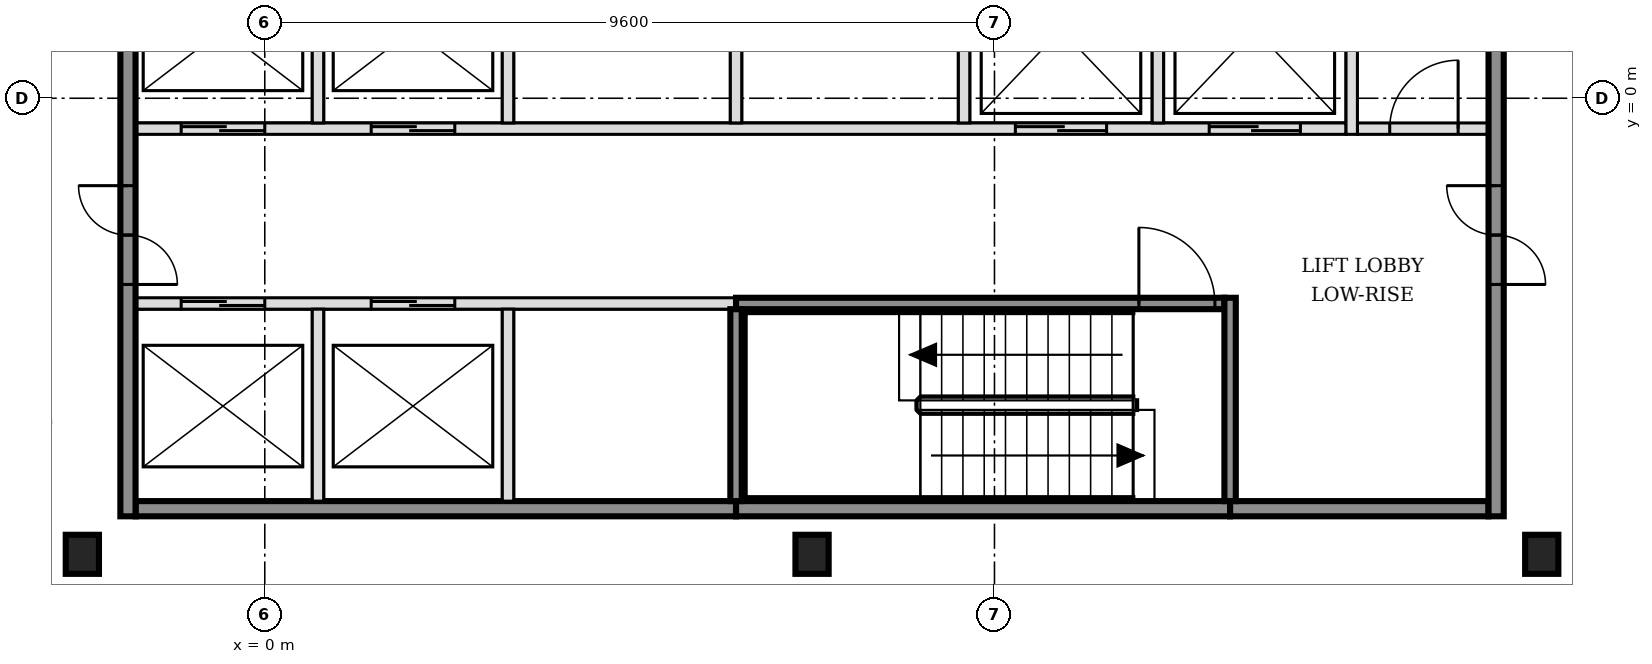
"""IFC4 building model, lengths in metres.
Left out: names, types, materials, properties, quantities, classifications, styles, units other than length and angle.
Written with IfcOpenShell. Run it as: python <this file> out.ifc"""

import sys

from ifc_helpers import new_model, si_unit, direction, frame, frame_2d, origin, origin_2d, place, context, subcontext, project, spatial, rectangle, i_section, extrude, element, fill, save


model = new_model("IFC4")
c1 = context("Model", 3, precision=1e-05, world=origin(), true_north=direction((0.0, 1.0)))
c2 = subcontext(c1, "Body", "Model", "MODEL_VIEW")
j1 = project(units=[si_unit("LENGTHUNIT", "METRE"), si_unit("PLANEANGLEUNIT", "RADIAN")], contexts=[c1])
p1 = place(None, origin())
s1 = spatial("IfcSite", under=j1, at=p1, CompositionType="ELEMENT")
p2 = place(p1, origin())
s2 = spatial("IfcBuilding", under=s1, at=p2, CompositionType="ELEMENT")
p3 = place(p2, frame((0.0, 0.0, 101.4)))
s3 = spatial("IfcBuildingStorey", under=s2, at=p3, CompositionType="ELEMENT", Elevation=101.4)
for number, where, z_axis, x_axis in (
    (1, (-2.4, -6.0, -0.15), (0.0, 0.0, 1.0), (1.0, 0.0, 0.0)),
    (2, (7.2, -6.0, -0.15), (0.0, 0.0, 1.0), (1.0, 0.0, 0.0)),
    (3, (16.8, -6.0, -0.15), (0.0, 0.0, 1.0), (1.0, 0.0, 0.0)),
):
    element("IfcColumn", number, at=place(p3, frame(where, z_axis=z_axis, x_axis=x_axis)), inside=s3, PredefinedType="COLUMN", context=c2, shape_type="SweptSolid", body=[
        extrude(i_section(OverallWidth=0.437, OverallDepth=0.514, WebThickness=0.061, FlangeThickness=0.097, FilletRadius=0.015, at=origin_2d()), origin(), (0.0, 0.0, 1.0), 3.6),
    ])
p4 = place(p3, frame((-1.7, -5.4, 0.0), z_axis=(0.0, 0.0, 1.0), x_axis=(1.0, 0.0, 0.0)))
e4 = element("IfcWall", 4, at=p4, inside=s3, PredefinedType="SOLIDWALL", context=c2, shape_type="SweptSolid", body=[
    extrude(rectangle(XDim=7.9, YDim=0.2, at=frame_2d((3.95, 0.0))), origin(), (0.0, 0.0, 1.0), 3.45),
])
p5 = place(p3, frame((6.2, -5.4, 0.0), z_axis=(0.0, 0.0, 1.0), x_axis=(1.0, 0.0, 0.0)))
e5 = element("IfcWall", 5, at=p5, inside=s3, PredefinedType="SOLIDWALL", context=c2, shape_type="SweptSolid", body=[
    extrude(rectangle(XDim=6.5, YDim=0.2, at=frame_2d((3.25, 0.0))), origin(), (0.0, 0.0, 1.0), 3.45),
])
p6 = place(p3, frame((12.7, -5.4, 0.0), z_axis=(0.0, 0.0, 1.0), x_axis=(1.0, 0.0, 0.0)))
e6 = element("IfcWall", 6, at=p6, inside=s3, PredefinedType="SOLIDWALL", context=c2, shape_type="SweptSolid", body=[
    extrude(rectangle(XDim=3.4, YDim=0.2, at=frame_2d((1.7, 0.0))), origin(), (0.0, 0.0, 1.0), 3.45),
])
p7 = place(p3, frame((-1.7, -2.7, 0.0), z_axis=(0.0, 0.0, 1.0), x_axis=(1.0, 0.0, 0.0)))
e7 = element("IfcWall", 7, at=p7, inside=s3, PredefinedType="SOLIDWALL", context=c2, shape_type="SweptSolid", body=[
    extrude(rectangle(XDim=7.9, YDim=0.15, at=frame_2d((3.95, 0.0))), origin(), (0.0, 0.0, 1.0), 3.45),
])
p8 = place(p7, frame((0.6, 0.0, 0.0)))
e8 = element("IfcOpeningElement", 8, at=p8, cuts=e7, PredefinedType="OPENING", context=c2, shape_type="SweptSolid", body=[
    extrude(rectangle(XDim=1.1, YDim=2.1, at=frame_2d((0.55, 1.05))), frame((0.0, 0.085, 0.0), z_axis=(0.0, -1.0, 0.0), x_axis=(1.0, 0.0, 0.0)), (0.0, 0.0, 1.0), 0.17),
])
p9 = place(p7, frame((3.1, 0.0, 0.0)))
e9 = element("IfcOpeningElement", 9, at=p9, cuts=e7, PredefinedType="OPENING", context=c2, shape_type="SweptSolid", body=[
    extrude(rectangle(XDim=1.1, YDim=2.1, at=frame_2d((0.55, 1.05))), frame((0.0, 0.085, 0.0), z_axis=(0.0, -1.0, 0.0), x_axis=(1.0, 0.0, 0.0)), (0.0, 0.0, 1.0), 0.17),
])
p10 = place(p3, frame((6.2, -2.7, 0.0), z_axis=(0.0, 0.0, 1.0), x_axis=(1.0, 0.0, 0.0)))
e10 = element("IfcWall", 10, at=p10, inside=s3, PredefinedType="SOLIDWALL", context=c2, shape_type="SweptSolid", body=[
    extrude(rectangle(XDim=6.425, YDim=0.15, at=frame_2d((3.212, 0.0))), origin(), (0.0, 0.0, 1.0), 3.45),
])
p11 = place(p10, frame((5.3, 0.0, 0.0)))
e11 = element("IfcOpeningElement", 11, at=p11, cuts=e10, PredefinedType="OPENING", context=c2, shape_type="SweptSolid", body=[
    extrude(rectangle(XDim=1.0, YDim=2.1, at=frame_2d((0.5, 1.05))), frame((0.0, 0.085, 0.0), z_axis=(0.0, -1.0, 0.0), x_axis=(1.0, 0.0, 0.0)), (0.0, 0.0, 1.0), 0.17),
])
p12 = place(p3, frame((-1.7, -0.4, 0.0), z_axis=(0.0, 0.0, 1.0), x_axis=(1.0, 0.0, 0.0)))
e12 = element("IfcWall", 12, at=p12, inside=s3, PredefinedType="SOLIDWALL", context=c2, shape_type="SweptSolid", body=[
    extrude(rectangle(XDim=15.925, YDim=0.15, at=frame_2d((7.962, 0.0))), origin(), (0.0, 0.0, 1.0), 3.45),
])
p13 = place(p12, frame((0.6, 0.0, 0.0)))
e13 = element("IfcOpeningElement", 13, at=p13, cuts=e12, PredefinedType="OPENING", context=c2, shape_type="SweptSolid", body=[
    extrude(rectangle(XDim=1.1, YDim=2.1, at=frame_2d((0.55, 1.05))), frame((0.0, 0.085, 0.0), z_axis=(0.0, -1.0, 0.0), x_axis=(1.0, 0.0, 0.0)), (0.0, 0.0, 1.0), 0.17),
])
p14 = place(p12, frame((3.1, 0.0, 0.0)))
e14 = element("IfcOpeningElement", 14, at=p14, cuts=e12, PredefinedType="OPENING", context=c2, shape_type="SweptSolid", body=[
    extrude(rectangle(XDim=1.1, YDim=2.1, at=frame_2d((0.55, 1.05))), frame((0.0, 0.085, 0.0), z_axis=(0.0, -1.0, 0.0), x_axis=(1.0, 0.0, 0.0)), (0.0, 0.0, 1.0), 0.17),
])
p15 = place(p12, frame((11.575, 0.0, 0.0)))
e15 = element("IfcOpeningElement", 15, at=p15, cuts=e12, PredefinedType="OPENING", context=c2, shape_type="SweptSolid", body=[
    extrude(rectangle(XDim=1.2, YDim=2.1, at=frame_2d((0.6, 1.05))), frame((0.0, 0.085, 0.0), z_axis=(0.0, -1.0, 0.0), x_axis=(1.0, 0.0, 0.0)), (0.0, 0.0, 1.0), 0.17),
])
p16 = place(p12, frame((14.125, 0.0, 0.0)))
e16 = element("IfcOpeningElement", 16, at=p16, cuts=e12, PredefinedType="OPENING", context=c2, shape_type="SweptSolid", body=[
    extrude(rectangle(XDim=1.2, YDim=2.1, at=frame_2d((0.6, 1.05))), frame((0.0, 0.085, 0.0), z_axis=(0.0, -1.0, 0.0), x_axis=(1.0, 0.0, 0.0)), (0.0, 0.0, 1.0), 0.17),
])
p17 = place(p3, frame((14.375, -0.4, 0.0), z_axis=(0.0, 0.0, 1.0), x_axis=(1.0, 0.0, 0.0)))
e17 = element("IfcWall", 17, at=p17, inside=s3, PredefinedType="PARTITIONING", context=c2, shape_type="SweptSolid", body=[
    extrude(rectangle(XDim=1.725, YDim=0.15, at=frame_2d((0.863, 0.0))), origin(), (0.0, 0.0, 1.0), 3.45),
])
p18 = place(p17, frame((0.425, 0.0, 0.0)))
e18 = element("IfcOpeningElement", 18, at=p18, cuts=e17, PredefinedType="OPENING", context=c2, shape_type="SweptSolid", body=[
    extrude(rectangle(XDim=0.9, YDim=2.1, at=frame_2d((0.45, 1.05))), frame((0.0, 0.085, 0.0), z_axis=(0.0, -1.0, 0.0), x_axis=(1.0, 0.0, 0.0)), (0.0, 0.0, 1.0), 0.17),
])
p19 = place(p3, frame((-1.8, -5.5, 0.0), z_axis=(0.0, 0.0, 1.0), x_axis=(0.0, 1.0, 0.0)))
e19 = element("IfcWall", 19, at=p19, inside=s3, PredefinedType="SOLIDWALL", context=c2, shape_type="SweptSolid", body=[
    extrude(rectangle(XDim=15.8, YDim=0.2, at=frame_2d((7.9, 0.0))), origin(), (0.0, 0.0, 1.0), 3.45),
])
p20 = place(p19, frame((3.05, 0.0, 0.0)))
e20 = element("IfcOpeningElement", 20, at=p20, cuts=e19, PredefinedType="OPENING", context=c2, shape_type="SweptSolid", body=[
    extrude(rectangle(XDim=1.3, YDim=2.1, at=frame_2d((0.65, 1.05))), frame((0.0, 0.11, 0.0), z_axis=(0.0, -1.0, 0.0), x_axis=(1.0, 0.0, 0.0)), (0.0, 0.0, 1.0), 0.22),
])
p21 = place(p19, frame((11.45, 0.0, 0.0)))
e21 = element("IfcOpeningElement", 21, at=p21, cuts=e19, PredefinedType="OPENING", context=c2, shape_type="SweptSolid", body=[
    extrude(rectangle(XDim=1.3, YDim=2.1, at=frame_2d((0.65, 1.05))), frame((0.0, 0.11, 0.0), z_axis=(0.0, -1.0, 0.0), x_axis=(1.0, 0.0, 0.0)), (0.0, 0.0, 1.0), 0.22),
])
p22 = place(p3, frame((0.7, -5.3, 0.0), z_axis=(0.0, 0.0, 1.0), x_axis=(0.0, 1.0, 0.0)))
e22 = element("IfcWall", 22, at=p22, inside=s3, PredefinedType="SOLIDWALL", context=c2, shape_type="SweptSolid", body=[
    extrude(rectangle(XDim=2.525, YDim=0.15, at=frame_2d((1.263, 0.0))), origin(), (0.0, 0.0, 1.0), 3.45),
])
p23 = place(p3, frame((0.7, -0.325, 0.0), z_axis=(0.0, 0.0, 1.0), x_axis=(0.0, 1.0, 0.0)))
e23 = element("IfcWall", 23, at=p23, inside=s3, PredefinedType="SOLIDWALL", context=c2, shape_type="SweptSolid", body=[
    extrude(rectangle(XDim=2.45, YDim=0.15, at=frame_2d((1.225, 0.0))), origin(), (0.0, 0.0, 1.0), 3.45),
])
p24 = place(p3, frame((3.2, -5.3, 0.0), z_axis=(0.0, 0.0, 1.0), x_axis=(0.0, 1.0, 0.0)))
e24 = element("IfcWall", 24, at=p24, inside=s3, PredefinedType="SOLIDWALL", context=c2, shape_type="SweptSolid", body=[
    extrude(rectangle(XDim=2.525, YDim=0.15, at=frame_2d((1.263, 0.0))), origin(), (0.0, 0.0, 1.0), 3.45),
])
p25 = place(p3, frame((3.2, -0.325, 0.0), z_axis=(0.0, 0.0, 1.0), x_axis=(0.0, 1.0, 0.0)))
e25 = element("IfcWall", 25, at=p25, inside=s3, PredefinedType="SOLIDWALL", context=c2, shape_type="SweptSolid", body=[
    extrude(rectangle(XDim=2.45, YDim=0.15, at=frame_2d((1.225, 0.0))), origin(), (0.0, 0.0, 1.0), 3.45),
])
p26 = place(p3, frame((6.2, -5.3, 0.0), z_axis=(0.0, 0.0, 1.0), x_axis=(0.0, 1.0, 0.0)))
e26 = element("IfcWall", 26, at=p26, inside=s3, PredefinedType="SOLIDWALL", context=c2, shape_type="SweptSolid", body=[
    extrude(rectangle(XDim=2.525, YDim=0.15, at=frame_2d((1.263, 0.0))), origin(), (0.0, 0.0, 1.0), 3.45),
])
for number, where, z_axis, x_axis in (
    (27, (6.2, -0.325, 0.0), (0.0, 0.0, 1.0), (0.0, 1.0, 0.0)),
    (28, (9.2, -0.325, 0.0), (0.0, 0.0, 1.0), (0.0, 1.0, 0.0)),
    (29, (11.75, -0.325, 0.0), (0.0, 0.0, 1.0), (0.0, 1.0, 0.0)),
):
    element("IfcWall", number, at=place(p3, frame(where, z_axis=z_axis, x_axis=x_axis)), inside=s3, PredefinedType="SOLIDWALL", context=c2, shape_type="SweptSolid", body=[
        extrude(rectangle(XDim=2.45, YDim=0.15, at=frame_2d((1.225, 0.0))), origin(), (0.0, 0.0, 1.0), 3.45),
    ])
p27 = place(p3, frame((12.7, -5.3, 0.0), z_axis=(0.0, 0.0, 1.0), x_axis=(0.0, 1.0, 0.0)))
e30 = element("IfcWall", 30, at=p27, inside=s3, PredefinedType="SOLIDWALL", context=c2, shape_type="SweptSolid", body=[
    extrude(rectangle(XDim=2.675, YDim=0.15, at=frame_2d((1.337, 0.0))), origin(), (0.0, 0.0, 1.0), 3.45),
])
p28 = place(p3, frame((14.3, -0.475, 0.0), z_axis=(0.0, 0.0, 1.0), x_axis=(0.0, 1.0, 0.0)))
e31 = element("IfcWall", 31, at=p28, inside=s3, PredefinedType="SOLIDWALL", context=c2, shape_type="SweptSolid", body=[
    extrude(rectangle(XDim=2.75, YDim=0.15, at=frame_2d((1.375, 0.0))), origin(), (0.0, 0.0, 1.0), 3.45),
])
p29 = place(p3, frame((16.2, -5.5, 0.0), z_axis=(0.0, 0.0, 1.0), x_axis=(0.0, 1.0, 0.0)))
e32 = element("IfcWall", 32, at=p29, inside=s3, PredefinedType="SOLIDWALL", context=c2, shape_type="SweptSolid", body=[
    extrude(rectangle(XDim=15.8, YDim=0.2, at=frame_2d((7.9, 0.0))), origin(), (0.0, 0.0, 1.0), 3.45),
])
p30 = place(p29, frame((3.05, 0.0, 0.0)))
e33 = element("IfcOpeningElement", 33, at=p30, cuts=e32, PredefinedType="OPENING", context=c2, shape_type="SweptSolid", body=[
    extrude(rectangle(XDim=1.3, YDim=2.1, at=frame_2d((0.65, 1.05))), frame((0.0, 0.11, 0.0), z_axis=(0.0, -1.0, 0.0), x_axis=(1.0, 0.0, 0.0)), (0.0, 0.0, 1.0), 0.22),
])
p31 = place(p29, frame((11.45, 0.0, 0.0)))
e34 = element("IfcOpeningElement", 34, at=p31, cuts=e32, PredefinedType="OPENING", context=c2, shape_type="SweptSolid", body=[
    extrude(rectangle(XDim=1.3, YDim=2.1, at=frame_2d((0.65, 1.05))), frame((0.0, 0.11, 0.0), z_axis=(0.0, -1.0, 0.0), x_axis=(1.0, 0.0, 0.0)), (0.0, 0.0, 1.0), 0.22),
])
p32 = place(p8, origin())
e35 = element("IfcDoor", 35, at=p32, inside=s3, OperationType="DOUBLE_DOOR_SLIDING", PredefinedType="DOOR", context=c2, shape_type="SweptSolid", body=[
    extrude(rectangle(XDim=1.1, YDim=2.1, at=frame_2d((0.55, 1.05))), frame((0.0, 0.025, 0.0), z_axis=(0.0, -1.0, 0.0), x_axis=(1.0, 0.0, 0.0)), (0.0, 0.0, 1.0), 0.05),
])
fill(e8, e35)
p33 = place(p9, origin())
e36 = element("IfcDoor", 36, at=p33, inside=s3, OperationType="DOUBLE_DOOR_SLIDING", PredefinedType="DOOR", context=c2, shape_type="SweptSolid", body=[
    extrude(rectangle(XDim=1.1, YDim=2.1, at=frame_2d((0.55, 1.05))), frame((0.0, 0.025, 0.0), z_axis=(0.0, -1.0, 0.0), x_axis=(1.0, 0.0, 0.0)), (0.0, 0.0, 1.0), 0.05),
])
fill(e9, e36)
p34 = place(p13, origin())
e37 = element("IfcDoor", 37, at=p34, inside=s3, OperationType="DOUBLE_DOOR_SLIDING", PredefinedType="DOOR", context=c2, shape_type="SweptSolid", body=[
    extrude(rectangle(XDim=1.1, YDim=2.1, at=frame_2d((0.55, 1.05))), frame((0.0, 0.025, 0.0), z_axis=(0.0, -1.0, 0.0), x_axis=(1.0, 0.0, 0.0)), (0.0, 0.0, 1.0), 0.05),
])
fill(e13, e37)
p35 = place(p14, origin())
e38 = element("IfcDoor", 38, at=p35, inside=s3, OperationType="DOUBLE_DOOR_SLIDING", PredefinedType="DOOR", context=c2, shape_type="SweptSolid", body=[
    extrude(rectangle(XDim=1.1, YDim=2.1, at=frame_2d((0.55, 1.05))), frame((0.0, 0.025, 0.0), z_axis=(0.0, -1.0, 0.0), x_axis=(1.0, 0.0, 0.0)), (0.0, 0.0, 1.0), 0.05),
])
fill(e14, e38)
p36 = place(p15, origin())
e39 = element("IfcDoor", 39, at=p36, inside=s3, OperationType="DOUBLE_DOOR_SLIDING", PredefinedType="DOOR", context=c2, shape_type="SweptSolid", body=[
    extrude(rectangle(XDim=1.2, YDim=2.1, at=frame_2d((0.6, 1.05))), frame((0.0, 0.025, 0.0), z_axis=(0.0, -1.0, 0.0), x_axis=(1.0, 0.0, 0.0)), (0.0, 0.0, 1.0), 0.05),
])
fill(e15, e39)
p37 = place(p16, origin())
e40 = element("IfcDoor", 40, at=p37, inside=s3, OperationType="DOUBLE_DOOR_SLIDING", PredefinedType="DOOR", context=c2, shape_type="SweptSolid", body=[
    extrude(rectangle(XDim=1.2, YDim=2.1, at=frame_2d((0.6, 1.05))), frame((0.0, 0.025, 0.0), z_axis=(0.0, -1.0, 0.0), x_axis=(1.0, 0.0, 0.0)), (0.0, 0.0, 1.0), 0.05),
])
fill(e16, e40)
p38 = place(p11, origin())
e41 = element("IfcDoor", 41, at=p38, inside=s3, OperationType="SINGLE_SWING_LEFT", PredefinedType="DOOR", context=c2, shape_type="SweptSolid", body=[
    extrude(rectangle(XDim=1.0, YDim=2.1, at=frame_2d((0.5, 1.05))), frame((0.0, 0.025, 0.0), z_axis=(0.0, -1.0, 0.0), x_axis=(1.0, 0.0, 0.0)), (0.0, 0.0, 1.0), 0.05),
])
fill(e11, e41)
p39 = place(p20, origin())
e42 = element("IfcDoor", 42, at=p39, inside=s3, OperationType="DOUBLE_DOOR_SINGLE_SWING", PredefinedType="DOOR", context=c2, shape_type="SweptSolid", body=[
    extrude(rectangle(XDim=1.3, YDim=2.1, at=frame_2d((0.65, 1.05))), frame((0.0, 0.025, 0.0), z_axis=(0.0, -1.0, 0.0), x_axis=(1.0, 0.0, 0.0)), (0.0, 0.0, 1.0), 0.05),
])
fill(e20, e42)
p40 = place(p30, origin())
e43 = element("IfcDoor", 43, at=p40, inside=s3, OperationType="DOUBLE_DOOR_SINGLE_SWING", PredefinedType="DOOR", context=c2, shape_type="SweptSolid", body=[
    extrude(rectangle(XDim=1.3, YDim=2.1, at=frame_2d((0.65, 1.05))), frame((0.0, 0.025, 0.0), z_axis=(0.0, -1.0, 0.0), x_axis=(1.0, 0.0, 0.0)), (0.0, 0.0, 1.0), 0.05),
])
fill(e33, e43)
p41 = place(p18, origin())
e44 = element("IfcDoor", 44, at=p41, inside=s3, OperationType="SINGLE_SWING_RIGHT", PredefinedType="DOOR", context=c2, shape_type="SweptSolid", body=[
    extrude(rectangle(XDim=0.9, YDim=2.1, at=frame_2d((0.45, 1.05))), frame((0.0, 0.025, 0.0), z_axis=(0.0, -1.0, 0.0), x_axis=(1.0, 0.0, 0.0)), (0.0, 0.0, 1.0), 0.05),
])
fill(e18, e44)
save(model, sys.argv[1])
